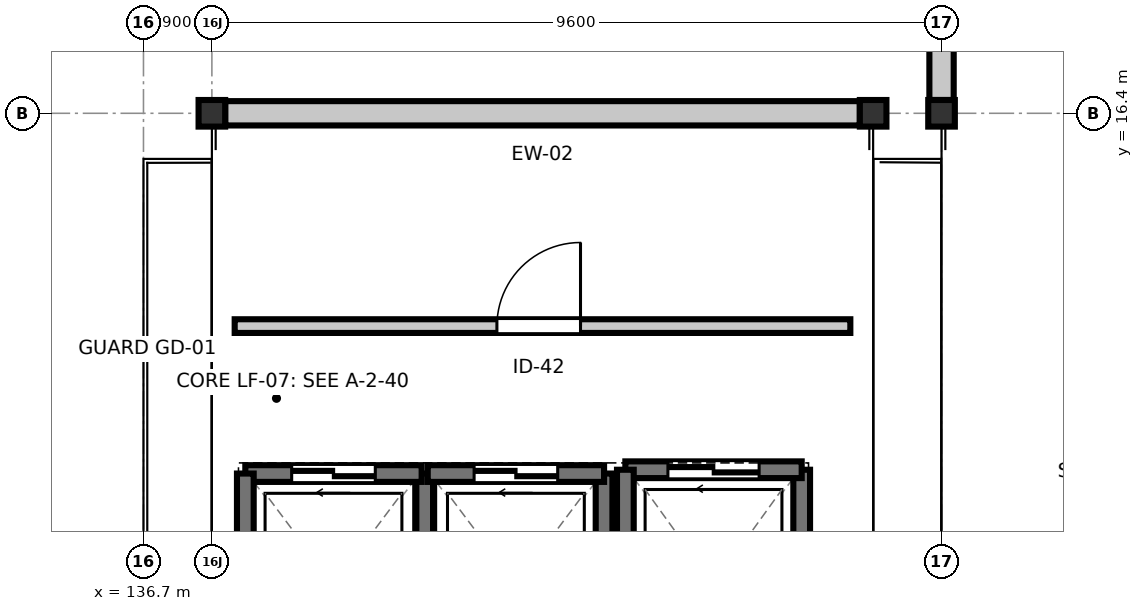
"""IFC4 building model, lengths in metres.
Left out: names, types, materials, properties, quantities, classifications, styles, units other than length and angle.
Written with IfcOpenShell. Run it as: python <this file> out.ifc"""

import sys

from ifc_helpers import new_model, si_unit, direction, frame, frame_2d, origin, origin_2d, place, context, subcontext, project, spatial, rectangle, i_section, extrude, element, fill, save


model = new_model("IFC4")
c1 = context("Model", 3, precision=1e-05, world=origin(), true_north=direction((0.0, 1.0)))
c2 = subcontext(c1, "Body", "Model", "MODEL_VIEW")
j1 = project(units=[si_unit("LENGTHUNIT", "METRE"), si_unit("PLANEANGLEUNIT", "RADIAN")], contexts=[c1])
p1 = place(None, origin())
s1 = spatial("IfcSite", under=j1, at=p1, CompositionType="ELEMENT")
p2 = place(p1, origin())
s2 = spatial("IfcBuilding", under=s1, at=p2, CompositionType="ELEMENT")
p3 = place(p2, frame((0.0, 0.0, 24.6)))
s3 = spatial("IfcBuildingStorey", under=s2, at=p3, CompositionType="ELEMENT", Elevation=24.6)
for number, where, z_axis, x_axis in (
    (1, (137.6, 16.4, 0.0), (0.0, 0.0, 1.0), (1.0, 0.0, 0.0)),
    (2, (146.3, 16.4, 0.0), (0.0, 0.0, 1.0), (1.0, 0.0, 0.0)),
):
    element("IfcColumn", number, at=place(p3, frame(where, z_axis=z_axis, x_axis=x_axis)), inside=s3, PredefinedType="COLUMN", context=c2, shape_type="SweptSolid", body=[
        extrude(i_section(OverallWidth=0.35, OverallDepth=0.35, WebThickness=0.012, FlangeThickness=0.019, FilletRadius=0.02, at=origin_2d()), origin(), (0.0, 0.0, 1.0), 9.0),
    ])
p4 = place(p3, frame((147.2, 16.4, 0.0), z_axis=(0.0, 0.0, 1.0), x_axis=(1.0, 0.0, 0.0)))
e3 = element("IfcColumn", 3, at=p4, inside=s3, PredefinedType="COLUMN", context=c2, shape_type="SweptSolid", body=[
    extrude(i_section(OverallWidth=0.35, OverallDepth=0.35, WebThickness=0.012, FlangeThickness=0.019, FilletRadius=0.02, at=origin_2d()), origin(), (0.0, 0.0, 1.0), 5.62),
])
p5 = place(p3, frame((146.125, 16.4, 0.0), z_axis=(0.0, 0.0, 1.0), x_axis=(-1.0, 0.0, 0.0)))
e4 = element("IfcWall", 4, at=p5, inside=s3, PredefinedType="STANDARD", context=c2, shape_type="SweptSolid", body=[
    extrude(rectangle(XDim=8.35, YDim=0.32, at=frame_2d((4.175, 0.0))), origin(), (0.0, 0.0, 1.0), 5.05),
])
p6 = place(p3, frame((147.2, 24.625, 0.0), z_axis=(0.0, 0.0, 1.0), x_axis=(0.0, -1.0, 0.0)))
e5 = element("IfcWall", 5, at=p6, inside=s3, PredefinedType="STANDARD", context=c2, shape_type="SweptSolid", body=[
    extrude(rectangle(XDim=8.05, YDim=0.32, at=frame_2d((4.025, 0.0))), origin(), (0.0, 0.0, 1.0), 5.05),
])
p7 = place(p6, frame((3.35, 0.0, 0.95)))
e6 = element("IfcOpeningElement", 6, at=p7, cuts=e5, PredefinedType="OPENING", context=c2, shape_type="SweptSolid", body=[
    extrude(rectangle(XDim=1.35, YDim=1.45, at=frame_2d((0.675, 0.725))), frame((0.0, 0.17, 0.0), z_axis=(0.0, -1.0, 0.0), x_axis=(1.0, 0.0, 0.0)), (0.0, 0.0, 1.0), 0.34),
])
p8 = place(p3, frame((140.4, 8.74, 0.0), z_axis=(0.0, 0.0, 1.0), x_axis=(0.0, 1.0, 0.0)))
e7 = element("IfcWall", 7, at=p8, inside=s3, PredefinedType="SHEAR", context=c2, shape_type="SweptSolid", body=[
    extrude(rectangle(XDim=2.92, YDim=0.22, at=frame_2d((1.46, 0.0))), origin(), (0.0, 0.0, 1.0), 4.3),
])
p9 = place(p3, frame((140.36, 11.66, 0.0), z_axis=(0.0, 0.0, 1.0), x_axis=(-1.0, 0.0, 0.0)))
e8 = element("IfcWall", 8, at=p9, inside=s3, PredefinedType="SHEAR", context=c2, shape_type="SweptSolid", body=[
    extrude(rectangle(XDim=2.32, YDim=0.22, at=frame_2d((1.16, 0.0))), origin(), (0.0, 0.0, 1.0), 4.3),
])
p10 = place(p9, frame((0.61, 0.0, 0.0)))
e9 = element("IfcOpeningElement", 9, at=p10, cuts=e8, PredefinedType="OPENING", context=c2, shape_type="SweptSolid", body=[
    extrude(rectangle(XDim=1.1, YDim=2.15, at=frame_2d((0.55, 1.075))), frame((0.0, 0.12, 0.0), z_axis=(0.0, -1.0, 0.0), x_axis=(1.0, 0.0, 0.0)), (0.0, 0.0, 1.0), 0.24),
])
for number, where, z_axis, x_axis in (
    (10, (138.04, 11.66, 0.0), (0.0, 0.0, 1.0), (0.0, -1.0, 0.0)),
    (11, (142.76, 8.74, 0.0), (0.0, 0.0, 1.0), (0.0, 1.0, 0.0)),
):
    element("IfcWall", number, at=place(p3, frame(where, z_axis=z_axis, x_axis=x_axis)), inside=s3, PredefinedType="SHEAR", context=c2, shape_type="SweptSolid", body=[
        extrude(rectangle(XDim=2.92, YDim=0.22, at=frame_2d((1.46, 0.0))), origin(), (0.0, 0.0, 1.0), 4.3),
    ])
p11 = place(p3, frame((142.76, 11.66, 0.0), z_axis=(0.0, 0.0, 1.0), x_axis=(-1.0, 0.0, 0.0)))
e12 = element("IfcWall", 12, at=p11, inside=s3, PredefinedType="SHEAR", context=c2, shape_type="SweptSolid", body=[
    extrude(rectangle(XDim=2.32, YDim=0.22, at=frame_2d((1.16, 0.0))), origin(), (0.0, 0.0, 1.0), 4.3),
])
p12 = place(p11, frame((0.61, 0.0, 0.0)))
e13 = element("IfcOpeningElement", 13, at=p12, cuts=e12, PredefinedType="OPENING", context=c2, shape_type="SweptSolid", body=[
    extrude(rectangle(XDim=1.1, YDim=2.15, at=frame_2d((0.55, 1.075))), frame((0.0, 0.12, 0.0), z_axis=(0.0, -1.0, 0.0), x_axis=(1.0, 0.0, 0.0)), (0.0, 0.0, 1.0), 0.24),
])
p13 = place(p3, frame((145.36, 8.69, 0.0), z_axis=(0.0, 0.0, 1.0), x_axis=(0.0, 1.0, 0.0)))
e14 = element("IfcWall", 14, at=p13, inside=s3, PredefinedType="SHEAR", context=c2, shape_type="SweptSolid", body=[
    extrude(rectangle(XDim=3.02, YDim=0.22, at=frame_2d((1.51, 0.0))), origin(), (0.0, 0.0, 1.0), 4.3),
])
p14 = place(p3, frame((145.36, 11.71, 0.0), z_axis=(0.0, 0.0, 1.0), x_axis=(-1.0, 0.0, 0.0)))
e15 = element("IfcWall", 15, at=p14, inside=s3, PredefinedType="SHEAR", context=c2, shape_type="SweptSolid", body=[
    extrude(rectangle(XDim=2.32, YDim=0.22, at=frame_2d((1.16, 0.0))), origin(), (0.0, 0.0, 1.0), 4.3),
])
p15 = place(p14, frame((0.56, 0.0, 0.0)))
e16 = element("IfcOpeningElement", 16, at=p15, cuts=e15, PredefinedType="OPENING", context=c2, shape_type="SweptSolid", body=[
    extrude(rectangle(XDim=1.2, YDim=2.15, at=frame_2d((0.6, 1.075))), frame((0.0, 0.12, 0.0), z_axis=(0.0, -1.0, 0.0), x_axis=(1.0, 0.0, 0.0)), (0.0, 0.0, 1.0), 0.24),
])
p16 = place(p3, frame((143.04, 11.71, 0.0), z_axis=(0.0, 0.0, 1.0), x_axis=(0.0, -1.0, 0.0)))
e17 = element("IfcWall", 17, at=p16, inside=s3, PredefinedType="SHEAR", context=c2, shape_type="SweptSolid", body=[
    extrude(rectangle(XDim=3.02, YDim=0.22, at=frame_2d((1.51, 0.0))), origin(), (0.0, 0.0, 1.0), 4.3),
])
p17 = place(p3, frame((137.9, 13.6, 0.0), z_axis=(0.0, 0.0, 1.0), x_axis=(1.0, 0.0, 0.0)))
e18 = element("IfcWall", 18, at=p17, inside=s3, PredefinedType="PARTITIONING", context=c2, shape_type="SweptSolid", body=[
    extrude(rectangle(XDim=8.1, YDim=0.18, at=frame_2d((4.05, 0.0))), origin(), (0.0, 0.0, 1.0), 4.0),
])
p18 = place(p17, frame((3.45, 0.0, 0.0)))
e19 = element("IfcOpeningElement", 19, at=p18, cuts=e18, PredefinedType="OPENING", context=c2, shape_type="SweptSolid", body=[
    extrude(rectangle(XDim=1.1, YDim=2.14, at=frame_2d((0.55, 1.07))), frame((0.0, 0.1, 0.0), z_axis=(0.0, -1.0, 0.0), x_axis=(1.0, 0.0, 0.0)), (0.0, 0.0, 1.0), 0.2),
])
p19 = place(p10, origin())
e20 = element("IfcDoor", 20, at=p19, inside=s3, OperationType="DOUBLE_DOOR_SLIDING", PredefinedType="DOOR", context=c2, shape_type="SweptSolid", body=[
    extrude(rectangle(XDim=1.1, YDim=2.15, at=frame_2d((0.55, 1.075))), frame((0.0, 0.025, 0.0), z_axis=(0.0, -1.0, 0.0), x_axis=(1.0, 0.0, 0.0)), (0.0, 0.0, 1.0), 0.05),
])
fill(e9, e20)
p20 = place(p12, origin())
e21 = element("IfcDoor", 21, at=p20, inside=s3, OperationType="DOUBLE_DOOR_SLIDING", PredefinedType="DOOR", context=c2, shape_type="SweptSolid", body=[
    extrude(rectangle(XDim=1.1, YDim=2.15, at=frame_2d((0.55, 1.075))), frame((0.0, 0.025, 0.0), z_axis=(0.0, -1.0, 0.0), x_axis=(1.0, 0.0, 0.0)), (0.0, 0.0, 1.0), 0.05),
])
fill(e13, e21)
p21 = place(p15, origin())
e22 = element("IfcDoor", 22, at=p21, inside=s3, OperationType="DOUBLE_DOOR_SLIDING", PredefinedType="DOOR", context=c2, shape_type="SweptSolid", body=[
    extrude(rectangle(XDim=1.2, YDim=2.15, at=frame_2d((0.6, 1.075))), frame((0.0, 0.025, 0.0), z_axis=(0.0, -1.0, 0.0), x_axis=(1.0, 0.0, 0.0)), (0.0, 0.0, 1.0), 0.05),
])
fill(e16, e22)
p22 = place(p18, origin())
e23 = element("IfcDoor", 23, at=p22, inside=s3, OperationType="SINGLE_SWING_RIGHT", PredefinedType="DOOR", context=c2, shape_type="SweptSolid", body=[
    extrude(rectangle(XDim=1.1, YDim=2.14, at=frame_2d((0.55, 1.07))), frame((0.0, 0.025, 0.0), z_axis=(0.0, -1.0, 0.0), x_axis=(1.0, 0.0, 0.0)), (0.0, 0.0, 1.0), 0.05),
])
fill(e19, e23)
save(model, sys.argv[1])
